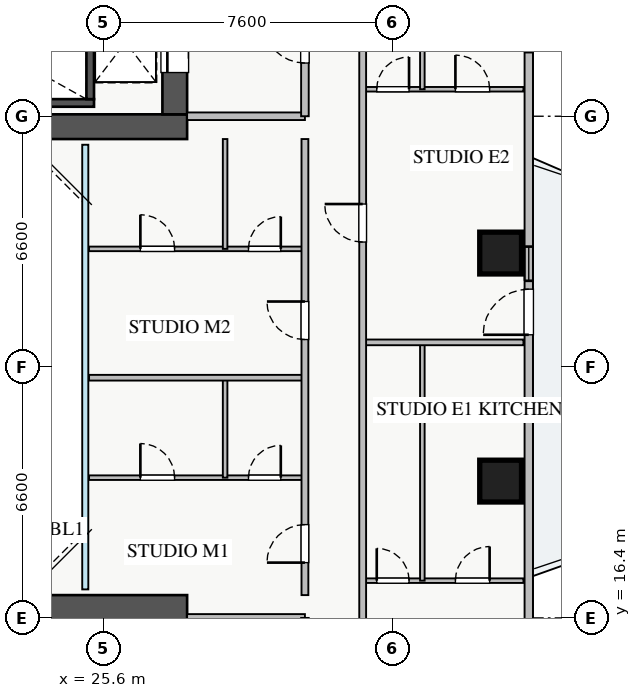
"""IFC4 building model, lengths in metres.
Left out: names, types, materials, properties, quantities, classifications, styles, units other than length and angle.
Written with IfcOpenShell. Run it as: python <this file> out.ifc"""

import sys

from ifc_helpers import new_model, si_unit, direction, frame, frame_2d, origin, origin_2d, place, context, subcontext, project, spatial, rectangle, extrude, source, transform, mapped, element, fill, save


model = new_model("IFC4")
c1 = context("Model", 3, precision=1e-05, world=origin(), true_north=direction((0.0, 1.0)))
c2 = subcontext(c1, "Body", "Model", "MODEL_VIEW")
j1 = project(units=[si_unit("LENGTHUNIT", "METRE"), si_unit("PLANEANGLEUNIT", "RADIAN")], contexts=[c1])
p1 = place(None, origin())
s1 = spatial("IfcSite", under=j1, at=p1, CompositionType="ELEMENT")
p2 = place(p1, origin())
s2 = spatial("IfcBuilding", under=s1, at=p2, CompositionType="ELEMENT")
p3 = place(p2, frame((0.0, 0.0, 113.25)))
s3 = spatial("IfcBuildingStorey", under=s2, at=p3, CompositionType="ELEMENT", Elevation=113.25)
p4 = place(p3, frame((18.2, 29.95, 0.0), z_axis=(0.0, 0.0, 1.0), x_axis=(1.0, 0.0, 0.0)))
e1 = element("IfcWall", 1, at=p4, inside=s3, PredefinedType="SHEAR", context=c2, shape_type="SweptSolid", body=[
    extrude(rectangle(XDim=7.15, YDim=0.2, at=frame_2d((3.575, 0.0))), origin(), (0.0, 0.0, 1.0), 3.25),
])
p5 = place(p3, frame((25.25, 30.05, 0.0), z_axis=(0.0, 0.0, 1.0), x_axis=(0.0, 1.0, 0.0)))
e2 = element("IfcWall", 2, at=p5, inside=s3, PredefinedType="SHEAR", context=c2, shape_type="SweptSolid", body=[
    extrude(rectangle(XDim=2.94, YDim=0.2, at=frame_2d((1.47, 0.0))), origin(), (0.0, 0.0, 1.0), 3.25),
])
p6 = place(p3, frame((10.2, 29.325, 0.0), z_axis=(0.0, 0.0, 1.0), x_axis=(1.0, 0.0, 0.0)))
e3 = element("IfcWall", 3, at=p6, inside=s3, PredefinedType="SHEAR", context=c2, shape_type="SweptSolid", body=[
    extrude(rectangle(XDim=17.6, YDim=0.65, at=frame_2d((8.8, 0.0))), origin(), (0.0, 0.0, 1.0), 3.25),
])
p7 = place(p3, frame((27.475, 29.65, 0.0), z_axis=(0.0, 0.0, 1.0), x_axis=(0.0, 1.0, 0.0)))
e4 = element("IfcWall", 4, at=p7, inside=s3, PredefinedType="SHEAR", context=c2, shape_type="SweptSolid", body=[
    extrude(rectangle(XDim=5.9, YDim=0.65, at=frame_2d((2.95, 0.0))), origin(), (0.0, 0.0, 1.0), 3.25),
])
p8 = place(p7, frame((1.1, 0.0, 0.0)))
e5 = element("IfcOpeningElement", 5, at=p8, cuts=e4, PredefinedType="OPENING", context=c2, shape_type="SweptSolid", body=[
    extrude(rectangle(XDim=1.3, YDim=2.05, at=frame_2d((0.65, 1.025))), frame((0.0, 0.335, 0.0), z_axis=(0.0, -1.0, 0.0), x_axis=(1.0, 0.0, 0.0)), (0.0, 0.0, 1.0), 0.67),
])
p9 = place(p3, frame((10.2, 16.675, 0.0), z_axis=(0.0, 0.0, 1.0), x_axis=(1.0, 0.0, 0.0)))
e6 = element("IfcWall", 6, at=p9, inside=s3, PredefinedType="SHEAR", context=c2, shape_type="SweptSolid", body=[
    extrude(rectangle(XDim=17.6, YDim=0.65, at=frame_2d((8.8, 0.0))), origin(), (0.0, 0.0, 1.0), 3.25),
])
m1 = source(origin(), c2, "Body", "SweptSolid", [
    extrude(rectangle(XDim=1.1, YDim=1.1, at=origin_2d()), origin(), (0.0, 0.0, 1.0), 3.25),
])
for number, where, z_axis, x_axis in (
    (7, (36.05, 20.0, 0.0), (0.0, 0.0, 1.0), (1.0, 0.0, 0.0)),
    (8, (36.05, 26.0, 0.0), (0.0, 0.0, 1.0), (1.0, 0.0, 0.0)),
):
    element("IfcColumn", number, at=place(p3, frame(where, z_axis=z_axis, x_axis=x_axis)), inside=s3, PredefinedType="COLUMN", context=c2, shape_type="MappedRepresentation", body=[
        mapped(m1, transform((0.0, 0.0, 0.0), x_axis=(1.0, 0.0, 0.0), y_axis=(0.0, 1.0, 0.0), z_axis=(0.0, 0.0, 1.0), scale=1.0)),
    ])
p10 = place(p3, frame((36.79, 10.55, 0.0), z_axis=(0.0, 0.0, 1.0), x_axis=(0.0, 1.0, 0.0)))
e9 = element("IfcWall", 9, at=p10, inside=s3, PredefinedType="STANDARD", context=c2, shape_type="SweptSolid", body=[
    extrude(rectangle(XDim=24.9, YDim=0.22, at=frame_2d((12.45, 0.0))), origin(), (0.0, 0.0, 1.0), 2.61),
])
p11 = place(p10, frame((13.3, 0.0, 0.0)))
e10 = element("IfcOpeningElement", 10, at=p11, cuts=e9, PredefinedType="OPENING", context=c2, shape_type="SweptSolid", body=[
    extrude(rectangle(XDim=1.2, YDim=2.1, at=frame_2d((0.6, 1.05))), frame((0.0, 0.12, 0.0), z_axis=(0.0, -1.0, 0.0), x_axis=(1.0, 0.0, 0.0)), (0.0, 0.0, 1.0), 0.24),
])
p12 = place(p10, frame((1.912, 0.0, 0.9)))
e11 = element("IfcOpeningElement", 11, at=p12, cuts=e9, PredefinedType="OPENING", context=c2, shape_type="SweptSolid", body=[
    extrude(rectangle(XDim=2.4, YDim=1.48, at=frame_2d((1.2, 0.74))), frame((0.0, 0.12, 0.0), z_axis=(0.0, -1.0, 0.0), x_axis=(1.0, 0.0, 0.0)), (0.0, 0.0, 1.0), 0.24),
])
p13 = place(p10, frame((20.737, 0.0, 0.9)))
e12 = element("IfcOpeningElement", 12, at=p13, cuts=e9, PredefinedType="OPENING", context=c2, shape_type="SweptSolid", body=[
    extrude(rectangle(XDim=2.1, YDim=1.48, at=frame_2d((1.05, 0.74))), frame((0.0, 0.12, 0.0), z_axis=(0.0, -1.0, 0.0), x_axis=(1.0, 0.0, 0.0)), (0.0, 0.0, 1.0), 0.24),
])
p14 = place(p10, frame((14.72, 0.0, 0.9)))
e13 = element("IfcOpeningElement", 13, at=p14, cuts=e9, PredefinedType="OPENING", context=c2, shape_type="SweptSolid", body=[
    extrude(rectangle(XDim=0.9, YDim=1.2, at=frame_2d((0.45, 0.6))), frame((0.0, 0.12, 0.0), z_axis=(0.0, -1.0, 0.0), x_axis=(1.0, 0.0, 0.0)), (0.0, 0.0, 1.0), 0.24),
])
p15 = place(p3, frame((27.8, 29.6, 0.0), z_axis=(0.0, 0.0, 1.0), x_axis=(1.0, 0.0, 0.0)))
e14 = element("IfcWall", 14, at=p15, inside=s3, PredefinedType="PARTITIONING", context=c2, shape_type="SweptSolid", body=[
    extrude(rectangle(XDim=3.1, YDim=0.2, at=frame_2d((1.55, 0.0))), origin(), (0.0, 0.0, 1.0), 3.07),
])
p16 = place(p3, frame((30.9, 29.6, 0.0), z_axis=(0.0, 0.0, 1.0), x_axis=(0.0, 1.0, 0.0)))
e15 = element("IfcWall", 15, at=p16, inside=s3, PredefinedType="PARTITIONING", context=c2, shape_type="SweptSolid", body=[
    extrude(rectangle(XDim=3.9, YDim=0.2, at=frame_2d((1.95, 0.0))), origin(), (0.0, 0.0, 1.0), 3.07),
])
p17 = place(p16, frame((1.4, 0.0, 0.0)))
e16 = element("IfcOpeningElement", 16, at=p17, cuts=e15, PredefinedType="OPENING", context=c2, shape_type="SweptSolid", body=[
    extrude(rectangle(XDim=1.1, YDim=2.05, at=frame_2d((0.55, 1.025))), frame((0.0, 0.11, 0.0), z_axis=(0.0, -1.0, 0.0), x_axis=(1.0, 0.0, 0.0)), (0.0, 0.0, 1.0), 0.22),
])
p18 = place(p3, frame((27.8, 16.4, 0.0), z_axis=(0.0, 0.0, 1.0), x_axis=(1.0, 0.0, 0.0)))
e17 = element("IfcWall", 17, at=p18, inside=s3, PredefinedType="PARTITIONING", context=c2, shape_type="SweptSolid", body=[
    extrude(rectangle(XDim=3.1, YDim=0.2, at=frame_2d((1.55, 0.0))), origin(), (0.0, 0.0, 1.0), 3.07),
])
p19 = place(p3, frame((32.42, 17.38, 0.0), z_axis=(0.0, 0.0, 1.0), x_axis=(1.0, 0.0, 0.0)))
e18 = element("IfcWall", 18, at=p19, inside=s3, PredefinedType="PLUMBINGWALL", context=c2, shape_type="SweptSolid", body=[
    extrude(rectangle(XDim=4.23, YDim=0.12, at=frame_2d((2.115, 0.0))), origin(), (0.0, 0.0, 1.0), 3.07),
])
p20 = place(p19, frame((0.37, 0.0, 0.0)))
e19 = element("IfcOpeningElement", 19, at=p20, cuts=e18, PredefinedType="OPENING", context=c2, shape_type="SweptSolid", body=[
    extrude(rectangle(XDim=0.85, YDim=2.05, at=frame_2d((0.425, 1.025))), frame((0.0, 0.07, 0.0), z_axis=(0.0, -1.0, 0.0), x_axis=(1.0, 0.0, 0.0)), (0.0, 0.0, 1.0), 0.14),
])
p21 = place(p19, frame((2.44, 0.0, 0.0)))
e20 = element("IfcOpeningElement", 20, at=p21, cuts=e18, PredefinedType="OPENING", context=c2, shape_type="SweptSolid", body=[
    extrude(rectangle(XDim=0.9, YDim=2.05, at=frame_2d((0.45, 1.025))), frame((0.0, 0.07, 0.0), z_axis=(0.0, -1.0, 0.0), x_axis=(1.0, 0.0, 0.0)), (0.0, 0.0, 1.0), 0.14),
])
p22 = place(p3, frame((33.99, 17.38, 0.0), z_axis=(0.0, 0.0, 1.0), x_axis=(0.0, 1.0, 0.0)))
e21 = element("IfcWall", 21, at=p22, inside=s3, PredefinedType="PLUMBINGWALL", context=c2, shape_type="SweptSolid", body=[
    extrude(rectangle(XDim=6.27, YDim=0.12, at=frame_2d((3.135, 0.0))), origin(), (0.0, 0.0, 1.0), 3.07),
])
p23 = place(p3, frame((32.42, 30.31, 0.0), z_axis=(0.0, 0.0, 1.0), x_axis=(1.0, 0.0, 0.0)))
e22 = element("IfcWall", 22, at=p23, inside=s3, PredefinedType="PLUMBINGWALL", context=c2, shape_type="SweptSolid", body=[
    extrude(rectangle(XDim=4.23, YDim=0.12, at=frame_2d((2.115, 0.0))), origin(), (0.0, 0.0, 1.0), 3.07),
])
p24 = place(p23, frame((0.37, 0.0, 0.0)))
e23 = element("IfcOpeningElement", 23, at=p24, cuts=e22, PredefinedType="OPENING", context=c2, shape_type="SweptSolid", body=[
    extrude(rectangle(XDim=0.85, YDim=2.05, at=frame_2d((0.425, 1.025))), frame((0.0, 0.07, 0.0), z_axis=(0.0, -1.0, 0.0), x_axis=(1.0, 0.0, 0.0)), (0.0, 0.0, 1.0), 0.14),
])
p25 = place(p23, frame((2.44, 0.0, 0.0)))
e24 = element("IfcOpeningElement", 24, at=p25, cuts=e22, PredefinedType="OPENING", context=c2, shape_type="SweptSolid", body=[
    extrude(rectangle(XDim=0.9, YDim=2.05, at=frame_2d((0.45, 1.025))), frame((0.0, 0.07, 0.0), z_axis=(0.0, -1.0, 0.0), x_axis=(1.0, 0.0, 0.0)), (0.0, 0.0, 1.0), 0.14),
])
p26 = place(p3, frame((33.99, 30.31, 0.0), z_axis=(0.0, 0.0, 1.0), x_axis=(0.0, 1.0, 0.0)))
e25 = element("IfcWall", 25, at=p26, inside=s3, PredefinedType="PLUMBINGWALL", context=c2, shape_type="SweptSolid", body=[
    extrude(rectangle(XDim=5.67, YDim=0.12, at=frame_2d((2.835, 0.0))), origin(), (0.0, 0.0, 1.0), 3.07),
])
p27 = place(p3, frame((32.42, 23.65, 0.0), z_axis=(0.0, 0.0, 1.0), x_axis=(1.0, 0.0, 0.0)))
e26 = element("IfcWall", 26, at=p27, inside=s3, PredefinedType="PARTITIONING", context=c2, shape_type="SweptSolid", body=[
    extrude(rectangle(XDim=4.23, YDim=0.15, at=frame_2d((2.115, 0.0))), origin(), (0.0, 0.0, 1.0), 3.07),
])
p28 = place(p3, frame((32.42, 8.25, 0.0), z_axis=(0.0, 0.0, 1.0), x_axis=(0.0, 1.0, 0.0)))
e27 = element("IfcWall", 27, at=p28, inside=s3, PredefinedType="PARTITIONING", context=c2, shape_type="SweptSolid", body=[
    extrude(rectangle(XDim=29.5, YDim=0.18, at=frame_2d((14.75, 0.0))), origin(), (0.0, 0.0, 1.0), 3.07),
])
p29 = place(p28, frame((28.155, 0.0, 0.0)))
e28 = element("IfcOpeningElement", 28, at=p29, cuts=e27, PredefinedType="OPENING", context=c2, shape_type="SweptSolid", body=[
    extrude(rectangle(XDim=0.9, YDim=2.05, at=frame_2d((0.45, 1.025))), frame((0.0, 0.1, 0.0), z_axis=(0.0, -1.0, 0.0), x_axis=(1.0, 0.0, 0.0)), (0.0, 0.0, 1.0), 0.2),
])
p30 = place(p28, frame((0.445, 0.0, 0.0)))
e29 = element("IfcOpeningElement", 29, at=p30, cuts=e27, PredefinedType="OPENING", context=c2, shape_type="SweptSolid", body=[
    extrude(rectangle(XDim=0.9, YDim=2.05, at=frame_2d((0.45, 1.025))), frame((0.0, 0.1, 0.0), z_axis=(0.0, -1.0, 0.0), x_axis=(1.0, 0.0, 0.0)), (0.0, 0.0, 1.0), 0.2),
])
p31 = place(p28, frame((4.76, 0.0, 0.0)))
e30 = element("IfcOpeningElement", 30, at=p31, cuts=e27, PredefinedType="OPENING", context=c2, shape_type="SweptSolid", body=[
    extrude(rectangle(XDim=1.0, YDim=2.05, at=frame_2d((0.5, 1.025))), frame((0.0, 0.1, 0.0), z_axis=(0.0, -1.0, 0.0), x_axis=(1.0, 0.0, 0.0)), (0.0, 0.0, 1.0), 0.2),
])
p32 = place(p28, frame((18.04, 0.0, 0.0)))
e31 = element("IfcOpeningElement", 31, at=p32, cuts=e27, PredefinedType="OPENING", context=c2, shape_type="SweptSolid", body=[
    extrude(rectangle(XDim=1.0, YDim=2.05, at=frame_2d((0.5, 1.025))), frame((0.0, 0.1, 0.0), z_axis=(0.0, -1.0, 0.0), x_axis=(1.0, 0.0, 0.0)), (0.0, 0.0, 1.0), 0.2),
])
p33 = place(p3, frame((25.22, 20.09, 0.0), z_axis=(0.0, 0.0, 1.0), x_axis=(1.0, 0.0, 0.0)))
e32 = element("IfcWall", 32, at=p33, inside=s3, PredefinedType="PLUMBINGWALL", context=c2, shape_type="SweptSolid", body=[
    extrude(rectangle(XDim=5.68, YDim=0.12, at=frame_2d((2.84, 0.0))), origin(), (0.0, 0.0, 1.0), 2.625),
])
p34 = place(p33, frame((1.35, 0.0, 0.0)))
e33 = element("IfcOpeningElement", 33, at=p34, cuts=e32, PredefinedType="OPENING", context=c2, shape_type="SweptSolid", body=[
    extrude(rectangle(XDim=0.9, YDim=2.05, at=frame_2d((0.45, 1.025))), frame((0.0, 0.07, 0.0), z_axis=(0.0, -1.0, 0.0), x_axis=(1.0, 0.0, 0.0)), (0.0, 0.0, 1.0), 0.14),
])
p35 = place(p33, frame((4.195, 0.0, 0.0)))
e34 = element("IfcOpeningElement", 34, at=p35, cuts=e32, PredefinedType="OPENING", context=c2, shape_type="SweptSolid", body=[
    extrude(rectangle(XDim=0.85, YDim=2.05, at=frame_2d((0.425, 1.025))), frame((0.0, 0.07, 0.0), z_axis=(0.0, -1.0, 0.0), x_axis=(1.0, 0.0, 0.0)), (0.0, 0.0, 1.0), 0.14),
])
p36 = place(p3, frame((28.8, 20.09, 0.0), z_axis=(0.0, 0.0, 1.0), x_axis=(0.0, 1.0, 0.0)))
e35 = element("IfcWall", 35, at=p36, inside=s3, PredefinedType="PLUMBINGWALL", context=c2, shape_type="SweptSolid", body=[
    extrude(rectangle(XDim=2.63, YDim=0.12, at=frame_2d((1.315, 0.0))), origin(), (0.0, 0.0, 1.0), 3.07),
])
p37 = place(p3, frame((25.22, 26.11, 0.0), z_axis=(0.0, 0.0, 1.0), x_axis=(1.0, 0.0, 0.0)))
e36 = element("IfcWall", 36, at=p37, inside=s3, PredefinedType="PLUMBINGWALL", context=c2, shape_type="SweptSolid", body=[
    extrude(rectangle(XDim=5.68, YDim=0.12, at=frame_2d((2.84, 0.0))), origin(), (0.0, 0.0, 1.0), 2.625),
])
p38 = place(p37, frame((1.35, 0.0, 0.0)))
e37 = element("IfcOpeningElement", 37, at=p38, cuts=e36, PredefinedType="OPENING", context=c2, shape_type="SweptSolid", body=[
    extrude(rectangle(XDim=0.9, YDim=2.05, at=frame_2d((0.45, 1.025))), frame((0.0, 0.07, 0.0), z_axis=(0.0, -1.0, 0.0), x_axis=(1.0, 0.0, 0.0)), (0.0, 0.0, 1.0), 0.14),
])
p39 = place(p37, frame((4.195, 0.0, 0.0)))
e38 = element("IfcOpeningElement", 38, at=p39, cuts=e36, PredefinedType="OPENING", context=c2, shape_type="SweptSolid", body=[
    extrude(rectangle(XDim=0.85, YDim=2.05, at=frame_2d((0.425, 1.025))), frame((0.0, 0.07, 0.0), z_axis=(0.0, -1.0, 0.0), x_axis=(1.0, 0.0, 0.0)), (0.0, 0.0, 1.0), 0.14),
])
p40 = place(p3, frame((28.8, 26.11, 0.0), z_axis=(0.0, 0.0, 1.0), x_axis=(0.0, 1.0, 0.0)))
e39 = element("IfcWall", 39, at=p40, inside=s3, PredefinedType="PLUMBINGWALL", context=c2, shape_type="SweptSolid", body=[
    extrude(rectangle(XDim=2.89, YDim=0.12, at=frame_2d((1.445, 0.0))), origin(), (0.0, 0.0, 1.0), 3.07),
])
p41 = place(p3, frame((25.22, 22.72, 0.0), z_axis=(0.0, 0.0, 1.0), x_axis=(1.0, 0.0, 0.0)))
e40 = element("IfcWall", 40, at=p41, inside=s3, PredefinedType="PARTITIONING", context=c2, shape_type="SweptSolid", body=[
    extrude(rectangle(XDim=5.68, YDim=0.15, at=frame_2d((2.84, 0.0))), origin(), (0.0, 0.0, 1.0), 3.07),
])
p42 = place(p3, frame((30.9, 17.0, 0.0), z_axis=(0.0, 0.0, 1.0), x_axis=(0.0, 1.0, 0.0)))
e41 = element("IfcWall", 41, at=p42, inside=s3, PredefinedType="PARTITIONING", context=c2, shape_type="SweptSolid", body=[
    extrude(rectangle(XDim=12.0, YDim=0.18, at=frame_2d((6.0, 0.0))), origin(), (0.0, 0.0, 1.0), 3.07),
])
p43 = place(p42, frame((0.855, 0.0, 0.0)))
e42 = element("IfcOpeningElement", 42, at=p43, cuts=e41, PredefinedType="OPENING", context=c2, shape_type="SweptSolid", body=[
    extrude(rectangle(XDim=1.0, YDim=2.05, at=frame_2d((0.5, 1.025))), frame((0.0, 0.1, 0.0), z_axis=(0.0, -1.0, 0.0), x_axis=(1.0, 0.0, 0.0)), (0.0, 0.0, 1.0), 0.2),
])
p44 = place(p42, frame((6.725, 0.0, 0.0)))
e43 = element("IfcOpeningElement", 43, at=p44, cuts=e41, PredefinedType="OPENING", context=c2, shape_type="SweptSolid", body=[
    extrude(rectangle(XDim=1.0, YDim=2.05, at=frame_2d((0.5, 1.025))), frame((0.0, 0.1, 0.0), z_axis=(0.0, -1.0, 0.0), x_axis=(1.0, 0.0, 0.0)), (0.0, 0.0, 1.0), 0.2),
])
m2 = source(origin(), c2, "Body", "SweptSolid", [
    extrude(rectangle(XDim=1.2, YDim=2.1, at=frame_2d((0.6, 1.05))), frame((0.0, 0.025, 0.0), z_axis=(0.0, -1.0, 0.0), x_axis=(1.0, 0.0, 0.0)), (0.0, 0.0, 1.0), 0.05),
])
p45 = place(p11, origin())
e44 = element("IfcDoor", 44, at=p45, inside=s3, OperationType="SINGLE_SWING_LEFT", PredefinedType="DOOR", context=c2, shape_type="MappedRepresentation", body=[
    mapped(m2, transform((0.0, 0.0, 0.0), x_axis=(1.0, 0.0, 0.0), y_axis=(0.0, 1.0, 0.0), z_axis=(0.0, 0.0, 1.0), scale=1.0)),
])
fill(e10, e44)
m3 = source(origin(), c2, "Body", "SweptSolid", [
    extrude(rectangle(XDim=2.1, YDim=1.48, at=frame_2d((1.05, 0.74))), frame((0.0, 0.03, 0.0), z_axis=(0.0, -1.0, 0.0), x_axis=(1.0, 0.0, 0.0)), (0.0, 0.0, 1.0), 0.06),
])
p46 = place(p13, origin())
e45 = element("IfcWindow", 45, at=p46, inside=s3, PartitioningType="TRIPLE_PANEL_VERTICAL", PredefinedType="WINDOW", context=c2, shape_type="MappedRepresentation", body=[
    mapped(m3, transform((0.0, 0.0, 0.0), x_axis=(1.0, 0.0, 0.0), y_axis=(0.0, 1.0, 0.0), z_axis=(0.0, 0.0, 1.0), scale=1.0)),
])
fill(e12, e45)
m4 = source(origin(), c2, "Body", "SweptSolid", [
    extrude(rectangle(XDim=1.3, YDim=2.05, at=frame_2d((0.65, 1.025))), frame((0.0, 0.025, 0.0), z_axis=(0.0, -1.0, 0.0), x_axis=(1.0, 0.0, 0.0)), (0.0, 0.0, 1.0), 0.05),
])
p47 = place(p8, origin())
e46 = element("IfcDoor", 46, at=p47, inside=s3, OperationType="SLIDING_TO_LEFT", PredefinedType="DOOR", context=c2, shape_type="MappedRepresentation", body=[
    mapped(m4, transform((0.0, 0.0, 0.0), x_axis=(1.0, 0.0, 0.0), y_axis=(0.0, 1.0, 0.0), z_axis=(0.0, 0.0, 1.0), scale=1.0)),
])
fill(e5, e46)
m5 = source(origin(), c2, "Body", "SweptSolid", [
    extrude(rectangle(XDim=1.1, YDim=2.05, at=frame_2d((0.55, 1.025))), frame((0.0, 0.025, 0.0), z_axis=(0.0, -1.0, 0.0), x_axis=(1.0, 0.0, 0.0)), (0.0, 0.0, 1.0), 0.05),
])
p48 = place(p17, origin())
e47 = element("IfcDoor", 47, at=p48, inside=s3, OperationType="SINGLE_SWING_RIGHT", PredefinedType="DOOR", context=c2, shape_type="MappedRepresentation", body=[
    mapped(m5, transform((0.0, 0.0, 0.0), x_axis=(1.0, 0.0, 0.0), y_axis=(0.0, 1.0, 0.0), z_axis=(0.0, 0.0, 1.0), scale=1.0)),
])
fill(e16, e47)
m6 = source(origin(), c2, "Body", "SweptSolid", [
    extrude(rectangle(XDim=0.85, YDim=2.05, at=frame_2d((0.425, 1.025))), frame((0.0, 0.025, 0.0), z_axis=(0.0, -1.0, 0.0), x_axis=(1.0, 0.0, 0.0)), (0.0, 0.0, 1.0), 0.05),
])
p49 = place(p20, origin())
e48 = element("IfcDoor", 48, at=p49, inside=s3, OperationType="SINGLE_SWING_LEFT", PredefinedType="DOOR", context=c2, shape_type="MappedRepresentation", body=[
    mapped(m6, transform((0.0, 0.0, 0.0), x_axis=(1.0, 0.0, 0.0), y_axis=(0.0, 1.0, 0.0), z_axis=(0.0, 0.0, 1.0), scale=1.0)),
])
fill(e19, e48)
m7 = source(origin(), c2, "Body", "SweptSolid", [
    extrude(rectangle(XDim=0.9, YDim=2.05, at=frame_2d((0.45, 1.025))), frame((0.0, 0.025, 0.0), z_axis=(0.0, -1.0, 0.0), x_axis=(1.0, 0.0, 0.0)), (0.0, 0.0, 1.0), 0.05),
])
p50 = place(p21, origin())
e49 = element("IfcDoor", 49, at=p50, inside=s3, OperationType="SINGLE_SWING_RIGHT", PredefinedType="DOOR", context=c2, shape_type="MappedRepresentation", body=[
    mapped(m7, transform((0.0, 0.0, 0.0), x_axis=(1.0, 0.0, 0.0), y_axis=(0.0, 1.0, 0.0), z_axis=(0.0, 0.0, 1.0), scale=1.0)),
])
fill(e20, e49)
p51 = place(p24, origin())
e50 = element("IfcDoor", 50, at=p51, inside=s3, OperationType="SINGLE_SWING_RIGHT", PredefinedType="DOOR", context=c2, shape_type="MappedRepresentation", body=[
    mapped(m6, transform((0.0, 0.0, 0.0), x_axis=(1.0, 0.0, 0.0), y_axis=(0.0, 1.0, 0.0), z_axis=(0.0, 0.0, 1.0), scale=1.0)),
])
fill(e23, e50)
p52 = place(p25, origin())
e51 = element("IfcDoor", 51, at=p52, inside=s3, OperationType="SINGLE_SWING_LEFT", PredefinedType="DOOR", context=c2, shape_type="MappedRepresentation", body=[
    mapped(m7, transform((0.0, 0.0, 0.0), x_axis=(1.0, 0.0, 0.0), y_axis=(0.0, 1.0, 0.0), z_axis=(0.0, 0.0, 1.0), scale=1.0)),
])
fill(e24, e51)
m8 = source(origin(), c2, "Body", "SweptSolid", [
    extrude(rectangle(XDim=1.0, YDim=2.05, at=frame_2d((0.5, 1.025))), frame((0.0, 0.025, 0.0), z_axis=(0.0, -1.0, 0.0), x_axis=(1.0, 0.0, 0.0)), (0.0, 0.0, 1.0), 0.05),
])
p53 = place(p32, origin())
e52 = element("IfcDoor", 52, at=p53, inside=s3, OperationType="SINGLE_SWING_RIGHT", PredefinedType="DOOR", context=c2, shape_type="MappedRepresentation", body=[
    mapped(m8, transform((0.0, 0.0, 0.0), x_axis=(1.0, 0.0, 0.0), y_axis=(0.0, 1.0, 0.0), z_axis=(0.0, 0.0, 1.0), scale=1.0)),
])
fill(e31, e52)
p54 = place(p34, origin())
e53 = element("IfcDoor", 53, at=p54, inside=s3, OperationType="SINGLE_SWING_LEFT", PredefinedType="DOOR", context=c2, shape_type="MappedRepresentation", body=[
    mapped(m7, transform((0.0, 0.0, 0.0), x_axis=(1.0, 0.0, 0.0), y_axis=(0.0, 1.0, 0.0), z_axis=(0.0, 0.0, 1.0), scale=1.0)),
])
fill(e33, e53)
p55 = place(p35, origin())
e54 = element("IfcDoor", 54, at=p55, inside=s3, OperationType="SINGLE_SWING_RIGHT", PredefinedType="DOOR", context=c2, shape_type="MappedRepresentation", body=[
    mapped(m6, transform((0.0, 0.0, 0.0), x_axis=(1.0, 0.0, 0.0), y_axis=(0.0, 1.0, 0.0), z_axis=(0.0, 0.0, 1.0), scale=1.0)),
])
fill(e34, e54)
p56 = place(p38, origin())
e55 = element("IfcDoor", 55, at=p56, inside=s3, OperationType="SINGLE_SWING_LEFT", PredefinedType="DOOR", context=c2, shape_type="MappedRepresentation", body=[
    mapped(m7, transform((0.0, 0.0, 0.0), x_axis=(1.0, 0.0, 0.0), y_axis=(0.0, 1.0, 0.0), z_axis=(0.0, 0.0, 1.0), scale=1.0)),
])
fill(e37, e55)
p57 = place(p39, origin())
e56 = element("IfcDoor", 56, at=p57, inside=s3, OperationType="SINGLE_SWING_RIGHT", PredefinedType="DOOR", context=c2, shape_type="MappedRepresentation", body=[
    mapped(m6, transform((0.0, 0.0, 0.0), x_axis=(1.0, 0.0, 0.0), y_axis=(0.0, 1.0, 0.0), z_axis=(0.0, 0.0, 1.0), scale=1.0)),
])
fill(e38, e56)
p58 = place(p43, origin())
e57 = element("IfcDoor", 57, at=p58, inside=s3, OperationType="SINGLE_SWING_LEFT", PredefinedType="DOOR", context=c2, shape_type="MappedRepresentation", body=[
    mapped(m8, transform((0.0, 0.0, 0.0), x_axis=(1.0, 0.0, 0.0), y_axis=(0.0, 1.0, 0.0), z_axis=(0.0, 0.0, 1.0), scale=1.0)),
])
fill(e42, e57)
p59 = place(p44, origin())
e58 = element("IfcDoor", 58, at=p59, inside=s3, OperationType="SINGLE_SWING_RIGHT", PredefinedType="DOOR", context=c2, shape_type="MappedRepresentation", body=[
    mapped(m8, transform((0.0, 0.0, 0.0), x_axis=(1.0, 0.0, 0.0), y_axis=(0.0, 1.0, 0.0), z_axis=(0.0, 0.0, 1.0), scale=1.0)),
])
fill(e43, e58)
m9 = source(origin(), c2, "Body", "SweptSolid", [
    extrude(rectangle(XDim=0.9, YDim=1.2, at=frame_2d((0.45, 0.6))), frame((0.0, 0.03, 0.0), z_axis=(0.0, -1.0, 0.0), x_axis=(1.0, 0.0, 0.0)), (0.0, 0.0, 1.0), 0.06),
])
p60 = place(p14, origin())
e59 = element("IfcWindow", 59, at=p60, inside=s3, PartitioningType="SINGLE_PANEL", PredefinedType="WINDOW", context=c2, shape_type="MappedRepresentation", body=[
    mapped(m9, transform((0.0, 0.0, 0.0), x_axis=(1.0, 0.0, 0.0), y_axis=(0.0, 1.0, 0.0), z_axis=(0.0, 0.0, 1.0), scale=1.0)),
])
fill(e13, e59)
save(model, sys.argv[1])
